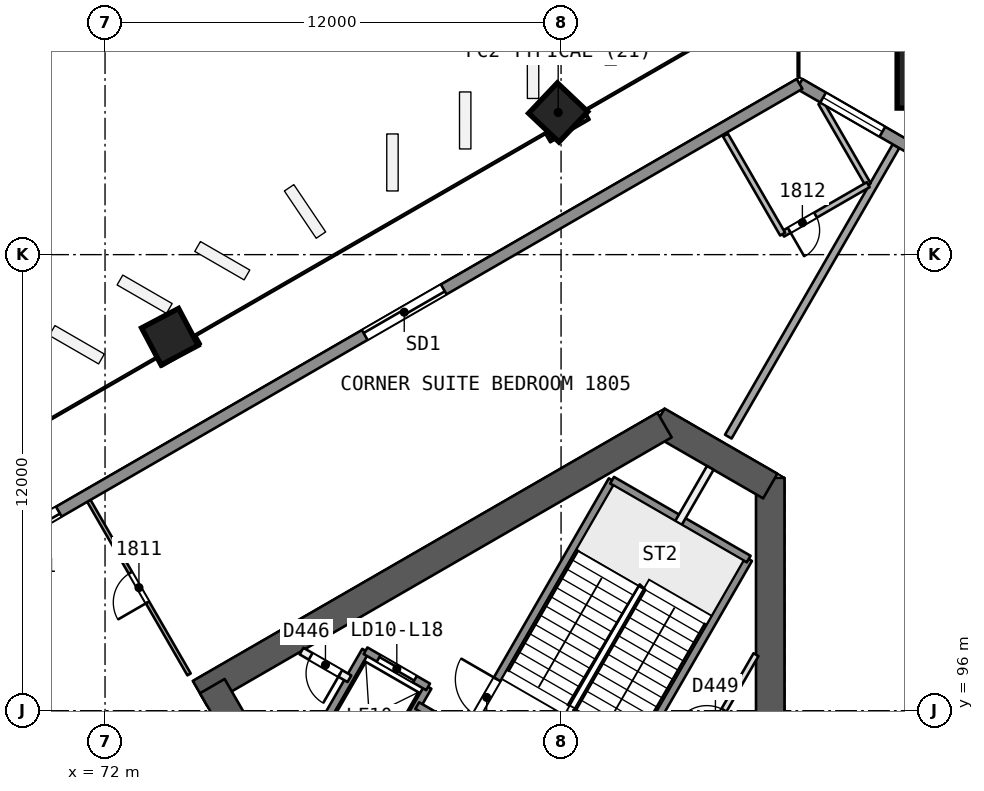
"""IFC4 building model, lengths in metres.
Left out: names, types, materials, properties, quantities, classifications, styles, units other than length and angle.
Written with IfcOpenShell. Run it as: python <this file> out.ifc"""

import sys

from ifc_helpers import new_model, si_unit, direction, frame, frame_2d, origin, origin_2d, place, context, subcontext, project, spatial, rectangle, extrude, element, fill, save


model = new_model("IFC4")
c1 = context("Model", 3, precision=1e-05, world=origin(), true_north=direction((0.0, 1.0)))
c2 = subcontext(c1, "Body", "Model", "MODEL_VIEW")
j1 = project(units=[si_unit("LENGTHUNIT", "METRE"), si_unit("PLANEANGLEUNIT", "RADIAN")], contexts=[c1])
p1 = place(None, origin())
s1 = spatial("IfcSite", under=j1, at=p1, CompositionType="ELEMENT")
p2 = place(p1, origin())
s2 = spatial("IfcBuilding", under=s1, at=p2, CompositionType="ELEMENT")
p3 = place(p2, frame((0.0, 0.0, 79.5)))
s3 = spatial("IfcBuildingStorey", under=s2, at=p3, CompositionType="ELEMENT", Elevation=79.5)
p4 = place(p3, frame((89.505, 88.169, 0.0), z_axis=(0.0, 0.0, 1.0), x_axis=(0.0, 1.0, 0.0)))
e1 = element("IfcWall", 1, at=p4, inside=s3, PredefinedType="SHEAR", context=c2, shape_type="SweptSolid", body=[
    extrude(rectangle(XDim=13.958, YDim=0.75, at=frame_2d((6.979, 0.0))), origin(), (0.0, 0.0, 1.0), 3.7),
])
p5 = place(p3, frame((89.505, 101.911, 0.0), z_axis=(0.0, 0.0, 1.0), x_axis=(-0.866017201164, 0.500014207086, 0.0)))
e2 = element("IfcWall", 2, at=p5, inside=s3, PredefinedType="SHEAR", context=c2, shape_type="SweptSolid", body=[
    extrude(rectangle(XDim=3.429, YDim=0.75, at=frame_2d((1.714, 0.0))), origin(), (0.0, 0.0, 1.0), 3.7),
])
p6 = place(p3, frame((86.723, 103.517, 0.0), z_axis=(0.0, 0.0, 1.0), x_axis=(-0.866020851292, -0.500007885066, 0.0)))
e3 = element("IfcWall", 3, at=p6, inside=s3, PredefinedType="SHEAR", context=c2, shape_type="SweptSolid", body=[
    extrude(rectangle(XDim=14.117, YDim=0.75, at=frame_2d((7.059, 0.0))), origin(), (0.0, 0.0, 1.0), 3.7),
])
p7 = place(p3, frame((74.822, 96.646, 0.0), z_axis=(0.0, 0.0, 1.0), x_axis=(0.499997052475, -0.866027105532, 0.0)))
e4 = element("IfcWall", 4, at=p7, inside=s3, PredefinedType="SHEAR", context=c2, shape_type="SweptSolid", body=[
    extrude(rectangle(XDim=10.005, YDim=0.75, at=frame_2d((5.002, 0.0))), origin(), (0.0, 0.0, 1.0), 3.7),
])
p8 = place(p7, frame((7.855, 0.0, 0.0)))
e5 = element("IfcOpeningElement", 5, at=p8, cuts=e4, PredefinedType="OPENING", context=c2, shape_type="SweptSolid", body=[
    extrude(rectangle(XDim=1.2, YDim=2.1, at=frame_2d((0.6, 1.05))), frame((0.0, 0.385, 0.0), z_axis=(0.0, -1.0, 0.0), x_axis=(1.0, 0.0, 0.0)), (0.0, 0.0, 1.0), 0.771),
])
p9 = place(p3, frame((94.164, 113.192, 0.0), z_axis=(-0.017607037296, -0.030466109479, 0.999380712447), x_axis=(0.500064653071, 0.865272876704, 0.035187946645)))
e6 = element("IfcColumn", 6, at=p9, inside=s3, PredefinedType="COLUMN", context=c2, shape_type="SweptSolid", body=[
    extrude(rectangle(XDim=2.6, YDim=2.6, at=origin_2d()), origin(), (0.0, 0.0, 1.0), 3.702),
])
p10 = place(p3, frame((83.934, 111.775, 0.0), z_axis=(-0.008376454378, -0.028163354484, 0.999568237028), x_axis=(0.86585218107, 0.499844611273, 0.021339285781)))
e7 = element("IfcColumn", 7, at=p10, inside=s3, PredefinedType="COLUMN", context=c2, shape_type="SweptSolid", body=[
    extrude(rectangle(XDim=1.1, YDim=1.1, at=origin_2d()), origin(), (0.0, 0.0, 1.0), 3.702),
])
p11 = place(p3, frame((73.704, 105.868, 0.0), z_axis=(0.000857580205, -0.022758859284, 0.9997406158), x_axis=(0.866006049772, 0.499920354613, 0.010637706611)))
e8 = element("IfcColumn", 8, at=p11, inside=s3, PredefinedType="COLUMN", context=c2, shape_type="SweptSolid", body=[
    extrude(rectangle(XDim=1.1, YDim=1.1, at=origin_2d()), origin(), (0.0, 0.0, 1.0), 3.701),
])
p12 = place(p3, frame((92.814, 110.855, 0.0), z_axis=(0.0, 0.0, 1.0), x_axis=(-0.49998584623, -0.866033575313, 0.0)))
e9 = element("IfcWall", 9, at=p12, inside=s3, PredefinedType="PARTITIONING", context=c2, shape_type="SweptSolid", body=[
    extrude(rectangle(XDim=8.826, YDim=0.2, at=frame_2d((4.413, 0.0))), origin(), (0.0, 0.0, 1.0), 3.2),
])
p13 = place(p3, frame((74.21, 96.956, 0.0), z_axis=(0.0, 0.0, 1.0), x_axis=(-0.499973627007, 0.866040629704, 0.0)))
e10 = element("IfcWall", 10, at=p13, inside=s3, PredefinedType="PARTITIONING", context=c2, shape_type="SweptSolid", body=[
    extrude(rectangle(XDim=5.273, YDim=0.1, at=frame_2d((2.636, 0.0))), origin(), (0.0, 0.0, 1.0), 3.2),
])
p14 = place(p13, frame((2.186, 0.0, 0.0)))
e11 = element("IfcOpeningElement", 11, at=p14, cuts=e10, PredefinedType="OPENING", context=c2, shape_type="SweptSolid", body=[
    extrude(rectangle(XDim=0.9, YDim=2.1, at=frame_2d((0.45, 1.05))), frame((0.0, 0.061, 0.0), z_axis=(0.0, -1.0, 0.0), x_axis=(1.0, 0.0, 0.0)), (0.0, 0.0, 1.0), 0.121),
])
p15 = place(p3, frame((68.064, 99.496, 0.0), z_axis=(0.0, 0.0, 1.0), x_axis=(0.499993034499, -0.866029425281, 0.0)))
e12 = element("IfcWall", 12, at=p15, inside=s3, PredefinedType="PARTITIONING", context=c2, shape_type="SweptSolid", body=[
    extrude(rectangle(XDim=13.252, YDim=0.2, at=frame_2d((6.626, 0.0))), origin(), (0.0, 0.0, 1.0), 3.2),
])
p16 = place(p3, frame((90.838, 111.996, 0.0), z_axis=(0.0, 0.0, 1.0), x_axis=(0.500011170278, -0.866018954525, 0.0)))
e13 = element("IfcWall", 13, at=p16, inside=s3, PredefinedType="PARTITIONING", context=c2, shape_type="SweptSolid", body=[
    extrude(rectangle(XDim=2.489, YDim=0.15, at=frame_2d((1.244, 0.0))), origin(), (0.0, 0.0, 1.0), 3.2),
])
p17 = place(p3, frame((92.082, 109.841, 0.0), z_axis=(0.0, 0.0, 1.0), x_axis=(-0.865997922154, -0.500047596559, 0.0)))
e14 = element("IfcWall", 14, at=p17, inside=s3, PredefinedType="PARTITIONING", context=c2, shape_type="SweptSolid", body=[
    extrude(rectangle(XDim=2.6, YDim=0.15, at=frame_2d((1.3, 0.0))), origin(), (0.0, 0.0, 1.0), 3.2),
])
p18 = place(p17, frame((1.6, 0.0, 0.0)))
e15 = element("IfcOpeningElement", 15, at=p18, cuts=e14, PredefinedType="OPENING", context=c2, shape_type="SweptSolid", body=[
    extrude(rectangle(XDim=0.8, YDim=2.1, at=frame_2d((0.4, 1.05))), frame((0.0, 0.085, 0.0), z_axis=(0.0, -1.0, 0.0), x_axis=(1.0, 0.0, 0.0)), (0.0, 0.0, 1.0), 0.171),
])
p19 = place(p3, frame((89.831, 108.541, 0.0), z_axis=(0.0, 0.0, 1.0), x_axis=(-0.500022102064, 0.866012642776, 0.0)))
e16 = element("IfcWall", 16, at=p19, inside=s3, PredefinedType="PARTITIONING", context=c2, shape_type="SweptSolid", body=[
    extrude(rectangle(XDim=3.009, YDim=0.15, at=frame_2d((1.504, 0.0))), origin(), (0.0, 0.0, 1.0), 3.2),
])
p20 = place(p3, frame((90.276, 112.492, 0.0), z_axis=(0.0, 0.0, 1.0), x_axis=(0.866037993248, -0.499978193775, 0.0)))
e17 = element("IfcWall", 17, at=p20, inside=s3, PredefinedType="SOLIDWALL", context=c2, shape_type="SweptSolid", body=[
    extrude(rectangle(XDim=6.032, YDim=0.3, at=frame_2d((3.016, 0.0))), origin(), (0.0, 0.0, 1.0), 3.2),
])
p21 = place(p20, frame((0.716, 0.0, 0.9)))
e18 = element("IfcOpeningElement", 18, at=p21, cuts=e17, PredefinedType="OPENING", context=c2, shape_type="SweptSolid", body=[
    extrude(rectangle(XDim=1.8, YDim=1.5, at=frame_2d((0.9, 0.75))), frame((0.0, 0.161, 0.0), z_axis=(0.0, -1.0, 0.0), x_axis=(1.0, 0.0, 0.0)), (0.0, 0.0, 1.0), 0.321),
])
p22 = place(p20, frame((3.667, 0.0, 0.9)))
e19 = element("IfcOpeningElement", 19, at=p22, cuts=e17, PredefinedType="OPENING", context=c2, shape_type="SweptSolid", body=[
    extrude(rectangle(XDim=1.8, YDim=1.5, at=frame_2d((0.9, 0.75))), frame((0.0, 0.161, 0.0), z_axis=(0.0, -1.0, 0.0), x_axis=(1.0, 0.0, 0.0)), (0.0, 0.0, 1.0), 0.321),
])
p23 = place(p3, frame((39.223, 83.016, 0.0), z_axis=(0.0, 0.0, 1.0), x_axis=(0.86602468924, 0.500001237625, 0.0)))
e20 = element("IfcWall", 20, at=p23, inside=s3, PredefinedType="SOLIDWALL", context=c2, shape_type="SweptSolid", body=[
    extrude(rectangle(XDim=58.951, YDim=0.3, at=frame_2d((29.476, 0.0))), origin(), (0.0, 0.0, 1.0), 3.2),
])
p24 = place(p23, frame((28.743, 0.0, 0.0)))
e21 = element("IfcOpeningElement", 21, at=p24, cuts=e20, PredefinedType="OPENING", context=c2, shape_type="SweptSolid", body=[
    extrude(rectangle(XDim=2.4, YDim=2.4, at=frame_2d((1.2, 1.2))), frame((0.0, 0.161, 0.0), z_axis=(0.0, -1.0, 0.0), x_axis=(1.0, 0.0, 0.0)), (0.0, 0.0, 1.0), 0.321),
])
p25 = place(p23, frame((34.043, 0.0, 0.0)))
e22 = element("IfcOpeningElement", 22, at=p25, cuts=e20, PredefinedType="OPENING", context=c2, shape_type="SweptSolid", body=[
    extrude(rectangle(XDim=2.4, YDim=2.4, at=frame_2d((1.2, 1.2))), frame((0.0, 0.161, 0.0), z_axis=(0.0, -1.0, 0.0), x_axis=(1.0, 0.0, 0.0)), (0.0, 0.0, 1.0), 0.321),
])
p26 = place(p23, frame((45.739, 0.0, 0.0)))
e23 = element("IfcOpeningElement", 23, at=p26, cuts=e20, PredefinedType="OPENING", context=c2, shape_type="SweptSolid", body=[
    extrude(rectangle(XDim=2.4, YDim=2.4, at=frame_2d((1.2, 1.2))), frame((0.0, 0.161, 0.0), z_axis=(0.0, -1.0, 0.0), x_axis=(1.0, 0.0, 0.0)), (0.0, 0.0, 1.0), 0.321),
])
p27 = place(p23, frame((22.976, 0.0, 0.0)))
e24 = element("IfcOpeningElement", 24, at=p27, cuts=e20, PredefinedType="OPENING", context=c2, shape_type="SweptSolid", body=[
    extrude(rectangle(XDim=2.4, YDim=2.4, at=frame_2d((1.2, 1.2))), frame((0.0, 0.161, 0.0), z_axis=(0.0, -1.0, 0.0), x_axis=(1.0, 0.0, 0.0)), (0.0, 0.0, 1.0), 0.321),
])
p28 = place(p23, frame((10.773, 0.0, 0.0)))
e25 = element("IfcOpeningElement", 25, at=p28, cuts=e20, PredefinedType="OPENING", context=c2, shape_type="SweptSolid", body=[
    extrude(rectangle(XDim=2.4, YDim=2.4, at=frame_2d((1.2, 1.2))), frame((0.0, 0.161, 0.0), z_axis=(0.0, -1.0, 0.0), x_axis=(1.0, 0.0, 0.0)), (0.0, 0.0, 1.0), 0.321),
])
p29 = place(p3, frame((87.021, 93.821, 0.0), z_axis=(0.0, 0.0, 1.0), x_axis=(0.499986337096, 0.866033291922, 0.0)))
e26 = element("IfcWall", 26, at=p29, inside=s3, PredefinedType="PARTITIONING", context=c2, shape_type="SweptSolid", body=[
    extrude(rectangle(XDim=4.218, YDim=0.15, at=frame_2d((2.109, 0.0))), origin(), (0.0, 0.0, 1.0), 3.2),
])
p30 = place(p29, frame((1.631, 0.0, 0.0)))
e27 = element("IfcOpeningElement", 27, at=p30, cuts=e26, PredefinedType="OPENING", context=c2, shape_type="SweptSolid", body=[
    extrude(rectangle(XDim=0.9, YDim=2.1, at=frame_2d((0.45, 1.05))), frame((0.0, 0.085, 0.0), z_axis=(0.0, -1.0, 0.0), x_axis=(1.0, 0.0, 0.0)), (0.0, 0.0, 1.0), 0.171),
])
p31 = place(p3, frame((85.087, 93.321, 0.0), z_axis=(0.0, 0.0, 1.0), x_axis=(0.500019787375, 0.866013979237, 0.0)))
e28 = element("IfcWall", 28, at=p31, inside=s3, PredefinedType="SOLIDWALL", context=c2, shape_type="SweptSolid", body=[
    extrude(rectangle(XDim=7.7, YDim=0.2, at=frame_2d((3.85, 0.0))), origin(), (0.0, 0.0, 1.0), 3.2),
])
p32 = place(p3, frame((87.09, 100.94, 0.0), z_axis=(0.0, 0.0, 1.0), x_axis=(0.499937194881, 0.866061661301, 0.0)))
e29 = element("IfcWall", 29, at=p32, inside=s3, PredefinedType="PARTITIONING", context=c2, shape_type="SweptSolid", body=[
    extrude(rectangle(XDim=1.673, YDim=0.2, at=frame_2d((0.836, 0.0))), origin(), (0.0, 0.0, 1.0), 3.2),
])
p33 = place(p3, frame((81.493, 95.396, 0.0), z_axis=(0.0, 0.0, 1.0), x_axis=(0.500006057782, 0.866021906294, 0.0)))
e30 = element("IfcWall", 30, at=p33, inside=s3, PredefinedType="SOLIDWALL", context=c2, shape_type="SweptSolid", body=[
    extrude(rectangle(XDim=7.7, YDim=0.2, at=frame_2d((3.85, 0.0))), origin(), (0.0, 0.0, 1.0), 3.2),
])
p34 = place(p33, frame((0.55, 0.0, 0.0)))
e31 = element("IfcOpeningElement", 31, at=p34, cuts=e30, PredefinedType="OPENING", context=c2, shape_type="SweptSolid", body=[
    extrude(rectangle(XDim=1.1, YDim=2.1, at=frame_2d((0.55, 1.05))), frame((0.0, 0.11, 0.0), z_axis=(0.0, -1.0, 0.0), x_axis=(1.0, 0.0, 0.0)), (0.0, 0.0, 1.0), 0.221),
])
for number, where, z_axis, x_axis in (
    (32, (78.976, 93.986, 0.0), (0.0, 0.0, 1.0), (0.5, 0.866, 0.0)),
    (33, (77.33, 94.936, 0.0), (0.0, 0.0, 1.0), (0.5, 0.866, 0.0)),
):
    element("IfcWall", number, at=place(p3, frame(where, z_axis=z_axis, x_axis=x_axis)), inside=s3, PredefinedType="SOLIDWALL", context=c2, shape_type="SweptSolid", body=[
        extrude(rectangle(XDim=3.05, YDim=0.2, at=frame_2d((1.525, 0.0))), origin(), (0.0, 0.0, 1.0), 3.2),
    ])
p35 = place(p3, frame((78.43, 96.841, 0.0), z_axis=(0.0, 0.0, 1.0), x_axis=(-0.866045896294, 0.499964504253, 0.0)))
e34 = element("IfcWall", 34, at=p35, inside=s3, PredefinedType="PARTITIONING", context=c2, shape_type="SweptSolid", body=[
    extrude(rectangle(XDim=1.455, YDim=0.2, at=frame_2d((0.728, 0.0))), origin(), (0.0, 0.0, 1.0), 3.2),
])
p36 = place(p35, frame((0.278, 0.0, 0.0)))
e35 = element("IfcOpeningElement", 35, at=p36, cuts=e34, PredefinedType="OPENING", context=c2, shape_type="SweptSolid", body=[
    extrude(rectangle(XDim=0.9, YDim=2.1, at=frame_2d((0.45, 1.05))), frame((0.0, 0.11, 0.0), z_axis=(0.0, -1.0, 0.0), x_axis=(1.0, 0.0, 0.0)), (0.0, 0.0, 1.0), 0.221),
])
p37 = place(p3, frame((88.01, 91.634, 0.0), z_axis=(0.0, 0.0, 1.0), x_axis=(-0.866024315419, 0.5000018851, 0.0)))
e36 = element("IfcWall", 36, at=p37, inside=s3, PredefinedType="SOLIDWALL", context=c2, shape_type="SweptSolid", body=[
    extrude(rectangle(XDim=9.0, YDim=0.2, at=frame_2d((4.5, 0.0))), origin(), (0.0, 0.0, 1.0), 3.2),
])
p38 = place(p3, frame((80.5, 96.627, 0.0), z_axis=(0.0, 0.0, 1.0), x_axis=(-0.86601224135, 0.500022797313, 0.0)))
e37 = element("IfcWall", 37, at=p38, inside=s3, PredefinedType="SOLIDWALL", context=c2, shape_type="SweptSolid", body=[
    extrude(rectangle(XDim=1.9, YDim=0.2, at=frame_2d((0.95, 0.0))), origin(), (0.0, 0.0, 1.0), 3.2),
])
p39 = place(p38, frame((0.4, 0.0, 0.0)))
e38 = element("IfcOpeningElement", 38, at=p39, cuts=e37, PredefinedType="OPENING", context=c2, shape_type="SweptSolid", body=[
    extrude(rectangle(XDim=1.1, YDim=2.1, at=frame_2d((0.55, 1.05))), frame((0.0, 0.11, 0.0), z_axis=(0.0, -1.0, 0.0), x_axis=(1.0, 0.0, 0.0)), (0.0, 0.0, 1.0), 0.221),
])
p40 = place(p3, frame((88.937, 99.99, 0.0), z_axis=(0.0, 0.0, 1.0), x_axis=(-0.866004344652, 0.500036473714, 0.0)))
e39 = element("IfcWall", 39, at=p40, inside=s3, PredefinedType="SOLIDWALL", context=c2, shape_type="SweptSolid", body=[
    extrude(rectangle(XDim=4.15, YDim=0.2, at=frame_2d((2.075, 0.0))), origin(), (0.0, 0.0, 1.0), 3.2),
])
p41 = place(p14, origin())
e40 = element("IfcDoor", 40, at=p41, inside=s3, OperationType="SINGLE_SWING_LEFT", PredefinedType="NOTDEFINED", context=c2, shape_type="SweptSolid", body=[
    extrude(rectangle(XDim=0.9, YDim=2.1, at=frame_2d((0.45, 1.05))), frame((0.0, 0.025, 0.0), z_axis=(0.0, -1.0, 0.0), x_axis=(1.0, 0.0, 0.0)), (0.0, 0.0, 1.0), 0.05),
])
fill(e11, e40)
p42 = place(p18, origin())
e41 = element("IfcDoor", 41, at=p42, inside=s3, OperationType="SINGLE_SWING_RIGHT", PredefinedType="NOTDEFINED", context=c2, shape_type="SweptSolid", body=[
    extrude(rectangle(XDim=0.8, YDim=2.1, at=frame_2d((0.4, 1.05))), frame((0.0, 0.025, 0.0), z_axis=(0.0, -1.0, 0.0), x_axis=(1.0, 0.0, 0.0)), (0.0, 0.0, 1.0), 0.05),
])
fill(e15, e41)
p43 = place(p21, origin())
e42 = element("IfcWindow", 42, at=p43, inside=s3, PartitioningType="SINGLE_PANEL", PredefinedType="WINDOW", context=c2, shape_type="SweptSolid", body=[
    extrude(rectangle(XDim=1.8, YDim=1.5, at=frame_2d((0.9, 0.75))), frame((0.0, 0.03, 0.0), z_axis=(0.0, -1.0, 0.0), x_axis=(1.0, 0.0, 0.0)), (0.0, 0.0, 1.0), 0.06),
])
fill(e18, e42)
p44 = place(p25, origin())
e43 = element("IfcDoor", 43, at=p44, inside=s3, OperationType="SLIDING_TO_RIGHT", PredefinedType="NOTDEFINED", context=c2, shape_type="SweptSolid", body=[
    extrude(rectangle(XDim=2.4, YDim=2.4, at=frame_2d((1.2, 1.2))), frame((0.0, 0.025, 0.0), z_axis=(0.0, -1.0, 0.0), x_axis=(1.0, 0.0, 0.0)), (0.0, 0.0, 1.0), 0.05),
])
fill(e22, e43)
p45 = place(p26, origin())
e44 = element("IfcDoor", 44, at=p45, inside=s3, OperationType="SLIDING_TO_LEFT", PredefinedType="NOTDEFINED", context=c2, shape_type="SweptSolid", body=[
    extrude(rectangle(XDim=2.4, YDim=2.4, at=frame_2d((1.2, 1.2))), frame((0.0, 0.025, 0.0), z_axis=(0.0, -1.0, 0.0), x_axis=(1.0, 0.0, 0.0)), (0.0, 0.0, 1.0), 0.05),
])
fill(e23, e44)
p46 = place(p39, origin())
e45 = element("IfcDoor", 45, at=p46, inside=s3, OperationType="SLIDING_TO_RIGHT", PredefinedType="NOTDEFINED", context=c2, shape_type="SweptSolid", body=[
    extrude(rectangle(XDim=1.1, YDim=2.1, at=frame_2d((0.55, 1.05))), frame((0.0, 0.025, 0.0), z_axis=(0.0, -1.0, 0.0), x_axis=(1.0, 0.0, 0.0)), (0.0, 0.0, 1.0), 0.05),
])
fill(e38, e45)
p47 = place(p36, origin())
e46 = element("IfcDoor", 46, at=p47, inside=s3, OperationType="SINGLE_SWING_LEFT", PredefinedType="NOTDEFINED", context=c2, shape_type="SweptSolid", body=[
    extrude(rectangle(XDim=0.9, YDim=2.1, at=frame_2d((0.45, 1.05))), frame((0.0, 0.025, 0.0), z_axis=(0.0, -1.0, 0.0), x_axis=(1.0, 0.0, 0.0)), (0.0, 0.0, 1.0), 0.05),
])
fill(e35, e46)
p48 = place(p34, origin())
e47 = element("IfcDoor", 47, at=p48, inside=s3, OperationType="SINGLE_SWING_RIGHT", PredefinedType="NOTDEFINED", context=c2, shape_type="SweptSolid", body=[
    extrude(rectangle(XDim=1.1, YDim=2.1, at=frame_2d((0.55, 1.05))), frame((0.0, 0.025, 0.0), z_axis=(0.0, -1.0, 0.0), x_axis=(1.0, 0.0, 0.0)), (0.0, 0.0, 1.0), 0.05),
])
fill(e31, e47)
p49 = place(p30, origin())
e48 = element("IfcDoor", 48, at=p49, inside=s3, OperationType="SINGLE_SWING_LEFT", PredefinedType="NOTDEFINED", context=c2, shape_type="SweptSolid", body=[
    extrude(rectangle(XDim=0.9, YDim=2.1, at=frame_2d((0.45, 1.05))), frame((0.0, 0.025, 0.0), z_axis=(0.0, -1.0, 0.0), x_axis=(1.0, 0.0, 0.0)), (0.0, 0.0, 1.0), 0.05),
])
fill(e27, e48)
save(model, sys.argv[1])
